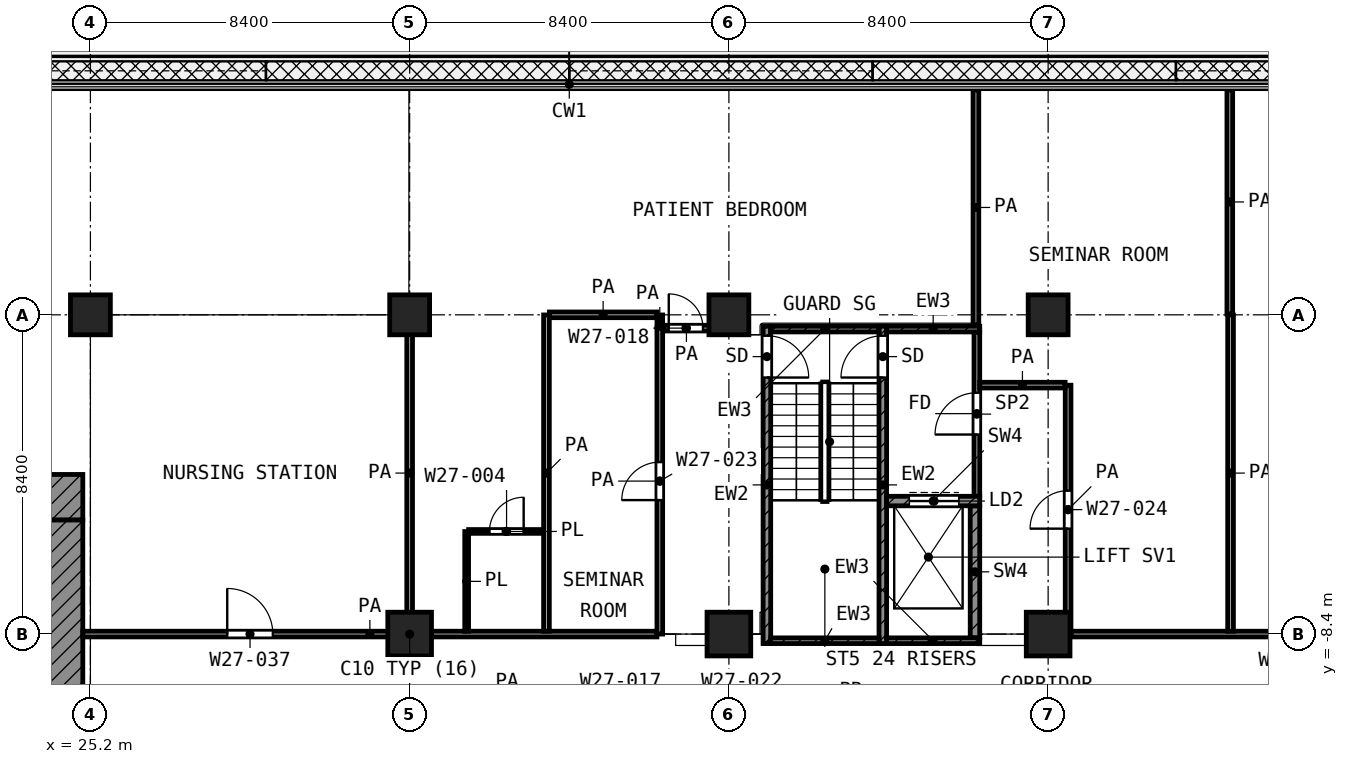
"""IFC4 building model, lengths in metres.
Left out: names, types, materials, properties, quantities, classifications, styles, units other than length and angle.
Written with IfcOpenShell. Run it as: python <this file> out.ifc"""

import sys

from ifc_helpers import new_model, si_unit, direction, frame, frame_2d, origin, origin_2d, place, context, subcontext, project, spatial, rectangle, extrude, element, fill, save


model = new_model("IFC4")
c1 = context("Model", 3, precision=1e-05, world=origin(), true_north=direction((0.0, 1.0)))
c2 = subcontext(c1, "Body", "Model", "MODEL_VIEW")
j1 = project(units=[si_unit("LENGTHUNIT", "METRE"), si_unit("PLANEANGLEUNIT", "RADIAN")], contexts=[c1])
p1 = place(None, origin())
s1 = spatial("IfcSite", under=j1, at=p1, CompositionType="ELEMENT")
p2 = place(p1, origin())
s2 = spatial("IfcBuilding", under=s1, at=p2, CompositionType="ELEMENT")
p3 = place(p2, frame((0.0, 0.0, 119.8)))
s3 = spatial("IfcBuildingStorey", under=s2, at=p3, CompositionType="ELEMENT", Elevation=119.8)
for number, where, z_axis, x_axis in (
    (1, (25.2, 0.0, 0.0), (0.0, 0.0, 1.0), (1.0, 0.0, 0.0)),
    (2, (33.6, 0.0, 0.0), (0.0, 0.0, 1.0), (1.0, 0.0, 0.0)),
    (3, (42.0, 0.0, 0.0), (0.0, 0.0, 1.0), (1.0, 0.0, 0.0)),
    (4, (50.4, 0.0, 0.0), (0.0, 0.0, 1.0), (1.0, 0.0, 0.0)),
):
    element("IfcColumn", number, at=place(p3, frame(where, z_axis=z_axis, x_axis=x_axis)), inside=s3, PredefinedType="COLUMN", context=c2, shape_type="SweptSolid", body=[
        extrude(rectangle(XDim=1.05, YDim=1.05, at=origin_2d()), origin(), (0.0, 0.0, 1.0), 4.2),
    ])
for number, where, z_axis, x_axis in (
    (5, (33.6, -8.4, 0.0), (0.0, 0.0, 1.0), (1.0, 0.0, 0.0)),
    (6, (42.0, -8.4, 0.0), (0.0, 0.0, 1.0), (1.0, 0.0, 0.0)),
    (7, (50.4, -8.4, 0.0), (0.0, 0.0, 1.0), (1.0, 0.0, 0.0)),
):
    element("IfcColumn", number, at=place(p3, frame(where, z_axis=z_axis, x_axis=x_axis)), inside=s3, PredefinedType="COLUMN", context=c2, shape_type="SweptSolid", body=[
        extrude(rectangle(XDim=1.15, YDim=1.15, at=origin_2d()), origin(), (0.0, 0.0, 1.0), 4.2),
    ])
p4 = place(p3, frame((4.2, -4.8, 0.0), z_axis=(0.0, 0.0, 1.0), x_axis=(1.0, 0.0, 0.0)))
e8 = element("IfcWall", 8, at=p4, inside=s3, PredefinedType="SHEAR", context=c2, shape_type="SweptSolid", body=[
    extrude(rectangle(XDim=20.8, YDim=1.2, at=frame_2d((10.4, 0.0))), origin(), (0.0, 0.0, 1.0), 3.6),
])
p5 = place(p4, frame((1.95, 0.0, 0.0)))
e9 = element("IfcOpeningElement", 9, at=p5, cuts=e8, PredefinedType="OPENING", context=c2, shape_type="SweptSolid", body=[
    extrude(rectangle(XDim=1.1, YDim=2.1, at=frame_2d((0.55, 1.05))), frame((0.0, 0.61, 0.0), z_axis=(0.0, -1.0, 0.0), x_axis=(1.0, 0.0, 0.0)), (0.0, 0.0, 1.0), 1.22),
])
p6 = place(p4, frame((17.95, 0.0, 0.0)))
e10 = element("IfcOpeningElement", 10, at=p6, cuts=e8, PredefinedType="OPENING", context=c2, shape_type="SweptSolid", body=[
    extrude(rectangle(XDim=1.1, YDim=2.1, at=frame_2d((0.55, 1.05))), frame((0.0, 0.61, 0.0), z_axis=(0.0, -1.0, 0.0), x_axis=(1.0, 0.0, 0.0)), (0.0, 0.0, 1.0), 1.22),
])
p7 = place(p3, frame((24.5, -24.0, 0.0), z_axis=(0.0, 0.0, 1.0), x_axis=(0.0, 1.0, 0.0)))
e11 = element("IfcWall", 11, at=p7, inside=s3, PredefinedType="SHEAR", context=c2, shape_type="SweptSolid", body=[
    extrude(rectangle(XDim=18.6, YDim=1.0, at=frame_2d((9.3, 0.0))), origin(), (0.0, 0.0, 1.0), 3.6),
])
p8 = place(p7, frame((10.5, 0.0, 0.0)))
e12 = element("IfcOpeningElement", 12, at=p8, cuts=e11, PredefinedType="OPENING", context=c2, shape_type="SweptSolid", body=[
    extrude(rectangle(XDim=1.8, YDim=2.1, at=frame_2d((0.9, 1.05))), frame((0.0, 0.51, 0.0), z_axis=(0.0, -1.0, 0.0), x_axis=(1.0, 0.0, 0.0)), (0.0, 0.0, 1.0), 1.02),
])
p9 = place(p3, frame((43.0, -8.65, 0.0), z_axis=(0.0, 0.0, 1.0), x_axis=(0.0, 1.0, 0.0)))
e13 = element("IfcWall", 13, at=p9, inside=s3, PredefinedType="SHEAR", context=c2, shape_type="SweptSolid", body=[
    extrude(rectangle(XDim=8.35, YDim=0.2, at=frame_2d((4.175, 0.0))), origin(), (0.0, 0.0, 1.0), 3.6),
])
p10 = place(p9, frame((7.0, 0.0, 0.0)))
e14 = element("IfcOpeningElement", 14, at=p10, cuts=e13, PredefinedType="OPENING", context=c2, shape_type="SweptSolid", body=[
    extrude(rectangle(XDim=1.1, YDim=2.1, at=frame_2d((0.55, 1.05))), frame((0.0, 0.11, 0.0), z_axis=(0.0, -1.0, 0.0), x_axis=(1.0, 0.0, 0.0)), (0.0, 0.0, 1.0), 0.22),
])
p11 = place(p3, frame((46.05, -8.65, 0.0), z_axis=(0.0, 0.0, 1.0), x_axis=(0.0, 1.0, 0.0)))
e15 = element("IfcWall", 15, at=p11, inside=s3, PredefinedType="SHEAR", context=c2, shape_type="SweptSolid", body=[
    extrude(rectangle(XDim=8.35, YDim=0.2, at=frame_2d((4.175, 0.0))), origin(), (0.0, 0.0, 1.0), 3.6),
])
p12 = place(p11, frame((7.0, 0.0, 0.0)))
e16 = element("IfcOpeningElement", 16, at=p12, cuts=e15, PredefinedType="OPENING", context=c2, shape_type="SweptSolid", body=[
    extrude(rectangle(XDim=1.1, YDim=2.1, at=frame_2d((0.55, 1.05))), frame((0.0, 0.11, 0.0), z_axis=(0.0, -1.0, 0.0), x_axis=(1.0, 0.0, 0.0)), (0.0, 0.0, 1.0), 0.22),
])
p13 = place(p3, frame((43.1, -0.375, 0.0), z_axis=(0.0, 0.0, 1.0), x_axis=(1.0, 0.0, 0.0)))
e17 = element("IfcWall", 17, at=p13, inside=s3, PredefinedType="SHEAR", context=c2, shape_type="SweptSolid", body=[
    extrude(rectangle(XDim=2.85, YDim=0.15, at=frame_2d((1.425, 0.0))), origin(), (0.0, 0.0, 1.0), 3.6),
])
p14 = place(p3, frame((46.15, -0.375, 0.0), z_axis=(0.0, 0.0, 1.0), x_axis=(1.0, 0.0, 0.0)))
e18 = element("IfcWall", 18, at=p14, inside=s3, PredefinedType="SHEAR", context=c2, shape_type="SweptSolid", body=[
    extrude(rectangle(XDim=2.45, YDim=0.15, at=frame_2d((1.225, 0.0))), origin(), (0.0, 0.0, 1.0), 3.6),
])
p15 = place(p3, frame((43.1, -8.575, 0.0), z_axis=(0.0, 0.0, 1.0), x_axis=(1.0, 0.0, 0.0)))
e19 = element("IfcWall", 19, at=p15, inside=s3, PredefinedType="SHEAR", context=c2, shape_type="SweptSolid", body=[
    extrude(rectangle(XDim=2.85, YDim=0.15, at=frame_2d((1.425, 0.0))), origin(), (0.0, 0.0, 1.0), 3.6),
])
p16 = place(p3, frame((46.15, -8.575, 0.0), z_axis=(0.0, 0.0, 1.0), x_axis=(1.0, 0.0, 0.0)))
e20 = element("IfcWall", 20, at=p16, inside=s3, PredefinedType="SHEAR", context=c2, shape_type="SweptSolid", body=[
    extrude(rectangle(XDim=2.45, YDim=0.15, at=frame_2d((1.225, 0.0))), origin(), (0.0, 0.0, 1.0), 3.6),
])
p17 = place(p3, frame((46.15, -4.9, 0.0), z_axis=(0.0, 0.0, 1.0), x_axis=(1.0, 0.0, 0.0)))
e21 = element("IfcWall", 21, at=p17, inside=s3, PredefinedType="SHEAR", context=c2, shape_type="SweptSolid", body=[
    extrude(rectangle(XDim=2.45, YDim=0.25, at=frame_2d((1.225, 0.0))), origin(), (0.0, 0.0, 1.0), 3.6),
])
p18 = place(p17, frame((0.6, 0.0, 0.0)))
e22 = element("IfcOpeningElement", 22, at=p18, cuts=e21, PredefinedType="OPENING", context=c2, shape_type="SweptSolid", body=[
    extrude(rectangle(XDim=1.3, YDim=2.1, at=frame_2d((0.65, 1.05))), frame((0.0, 0.135, 0.0), z_axis=(0.0, -1.0, 0.0), x_axis=(1.0, 0.0, 0.0)), (0.0, 0.0, 1.0), 0.27),
])
p19 = place(p3, frame((48.475, -8.5, 0.0), z_axis=(0.0, 0.0, 1.0), x_axis=(0.0, 1.0, 0.0)))
e23 = element("IfcWall", 23, at=p19, inside=s3, PredefinedType="SHEAR", context=c2, shape_type="SweptSolid", body=[
    extrude(rectangle(XDim=3.475, YDim=0.25, at=frame_2d((1.738, 0.0))), origin(), (0.0, 0.0, 1.0), 3.6),
])
p20 = place(p3, frame((48.525, -4.775, 0.0), z_axis=(0.0, 0.0, 1.0), x_axis=(0.0, 1.0, 0.0)))
e24 = element("IfcWall", 24, at=p20, inside=s3, PredefinedType="PARTITIONING", context=c2, shape_type="SweptSolid", body=[
    extrude(rectangle(XDim=4.325, YDim=0.15, at=frame_2d((2.163, 0.0))), origin(), (0.0, 0.0, 1.0), 3.6),
])
p21 = place(p20, frame((1.625, 0.0, 0.0)))
e25 = element("IfcOpeningElement", 25, at=p21, cuts=e24, PredefinedType="OPENING", context=c2, shape_type="SweptSolid", body=[
    extrude(rectangle(XDim=1.1, YDim=2.1, at=frame_2d((0.55, 1.05))), frame((0.0, 0.085, 0.0), z_axis=(0.0, -1.0, 0.0), x_axis=(1.0, 0.0, 0.0)), (0.0, 0.0, 1.0), 0.17),
])
p22 = place(p3, frame((35.151, -5.7, 0.0), z_axis=(0.0, 0.0, 1.0), x_axis=(1.0, 0.0, 0.0)))
e26 = element("IfcWall", 26, at=p22, inside=s3, PredefinedType="PARTITIONING", context=c2, shape_type="SweptSolid", body=[
    extrude(rectangle(XDim=1.974, YDim=0.1, at=frame_2d((0.987, 0.0))), origin(), (0.0, 0.0, 1.0), 3.6),
])
p23 = place(p22, frame((0.549, 0.0, 0.0)))
e27 = element("IfcOpeningElement", 27, at=p23, cuts=e26, PredefinedType="OPENING", context=c2, shape_type="SweptSolid", body=[
    extrude(rectangle(XDim=0.9, YDim=2.1, at=frame_2d((0.45, 1.05))), frame((0.0, 0.06, 0.0), z_axis=(0.0, -1.0, 0.0), x_axis=(1.0, 0.0, 0.0)), (0.0, 0.0, 1.0), 0.12),
])
p24 = place(p3, frame((35.1, -8.325, 0.0), z_axis=(0.0, 0.0, 1.0), x_axis=(0.0, 1.0, 0.0)))
e28 = element("IfcWall", 28, at=p24, inside=s3, PredefinedType="PARTITIONING", context=c2, shape_type="SweptSolid", body=[
    extrude(rectangle(XDim=2.623, YDim=0.1, at=frame_2d((1.312, 0.0))), origin(), (0.0, 0.0, 1.0), 3.6),
])
p25 = place(p3, frame((25.0, -8.4, 0.0), z_axis=(0.0, 0.0, 1.0), x_axis=(1.0, 0.0, 0.0)))
e29 = element("IfcWall", 29, at=p25, inside=s3, PredefinedType="PARTITIONING", context=c2, shape_type="SweptSolid", body=[
    extrude(rectangle(XDim=15.107, YDim=0.15, at=frame_2d((7.553, 0.0))), origin(), (0.0, 0.0, 1.0), 3.6),
])
p26 = place(p25, frame((3.8, 0.0, 0.0)))
e30 = element("IfcOpeningElement", 30, at=p26, cuts=e29, PredefinedType="OPENING", context=c2, shape_type="SweptSolid", body=[
    extrude(rectangle(XDim=1.2, YDim=2.1, at=frame_2d((0.6, 1.05))), frame((0.0, 0.085, 0.0), z_axis=(0.0, -1.0, 0.0), x_axis=(1.0, 0.0, 0.0)), (0.0, 0.0, 1.0), 0.17),
])
p27 = place(p3, frame((51.0, -8.4, 0.0), z_axis=(0.0, 0.0, 1.0), x_axis=(1.0, 0.0, 0.0)))
e31 = element("IfcWall", 31, at=p27, inside=s3, PredefinedType="PARTITIONING", context=c2, shape_type="SweptSolid", body=[
    extrude(rectangle(XDim=24.52, YDim=0.15, at=frame_2d((12.26, 0.0))), origin(), (0.0, 0.0, 1.0), 3.6),
])
p28 = place(p27, frame((5.4, 0.0, 0.0)))
e32 = element("IfcOpeningElement", 32, at=p28, cuts=e31, PredefinedType="OPENING", context=c2, shape_type="SweptSolid", body=[
    extrude(rectangle(XDim=1.2, YDim=2.1, at=frame_2d((0.6, 1.05))), frame((0.0, 0.085, 0.0), z_axis=(0.0, -1.0, 0.0), x_axis=(1.0, 0.0, 0.0)), (0.0, 0.0, 1.0), 0.17),
])
p29 = place(p27, frame((8.45, 0.0, 0.0)))
e33 = element("IfcOpeningElement", 33, at=p29, cuts=e31, PredefinedType="OPENING", context=c2, shape_type="SweptSolid", body=[
    extrude(rectangle(XDim=0.9, YDim=2.1, at=frame_2d((0.45, 1.05))), frame((0.0, 0.085, 0.0), z_axis=(0.0, -1.0, 0.0), x_axis=(1.0, 0.0, 0.0)), (0.0, 0.0, 1.0), 0.17),
])
p30 = place(p27, frame((14.0, 0.0, 0.0)))
e34 = element("IfcOpeningElement", 34, at=p30, cuts=e31, PredefinedType="OPENING", context=c2, shape_type="SweptSolid", body=[
    extrude(rectangle(XDim=1.2, YDim=2.1, at=frame_2d((0.6, 1.05))), frame((0.0, 0.085, 0.0), z_axis=(0.0, -1.0, 0.0), x_axis=(1.0, 0.0, 0.0)), (0.0, 0.0, 1.0), 0.17),
])
p31 = place(p27, frame((16.8, 0.0, 0.0)))
e35 = element("IfcOpeningElement", 35, at=p31, cuts=e31, PredefinedType="OPENING", context=c2, shape_type="SweptSolid", body=[
    extrude(rectangle(XDim=1.2, YDim=2.1, at=frame_2d((0.6, 1.05))), frame((0.0, 0.085, 0.0), z_axis=(0.0, -1.0, 0.0), x_axis=(1.0, 0.0, 0.0)), (0.0, 0.0, 1.0), 0.17),
])
p32 = place(p27, frame((22.15, 0.0, 0.0)))
e36 = element("IfcOpeningElement", 36, at=p32, cuts=e31, PredefinedType="OPENING", context=c2, shape_type="SweptSolid", body=[
    extrude(rectangle(XDim=1.0, YDim=2.1, at=frame_2d((0.5, 1.05))), frame((0.0, 0.085, 0.0), z_axis=(0.0, -1.0, 0.0), x_axis=(1.0, 0.0, 0.0)), (0.0, 0.0, 1.0), 0.17),
])
p33 = place(p3, frame((48.6, -1.85, 0.0), z_axis=(0.0, 0.0, 1.0), x_axis=(1.0, 0.0, 0.0)))
e37 = element("IfcWall", 37, at=p33, inside=s3, PredefinedType="PARTITIONING", context=c2, shape_type="SweptSolid", body=[
    extrude(rectangle(XDim=2.247, YDim=0.15, at=frame_2d((1.124, 0.0))), origin(), (0.0, 0.0, 1.0), 3.6),
])
p34 = place(p3, frame((40.277, -0.35, 0.0), z_axis=(0.0, 0.0, 1.0), x_axis=(1.0, 0.0, 0.0)))
e38 = element("IfcWall", 38, at=p34, inside=s3, PredefinedType="PARTITIONING", context=c2, shape_type="SweptSolid", body=[
    extrude(rectangle(XDim=1.211, YDim=0.15, at=frame_2d((0.605, 0.0))), origin(), (0.0, 0.0, 1.0), 3.6),
])
p35 = place(p34, frame((0.141, 0.0, 0.0)))
e39 = element("IfcOpeningElement", 39, at=p35, cuts=e38, PredefinedType="OPENING", context=c2, shape_type="SweptSolid", body=[
    extrude(rectangle(XDim=0.9, YDim=2.1, at=frame_2d((0.45, 1.05))), frame((0.0, 0.085, 0.0), z_axis=(0.0, -1.0, 0.0), x_axis=(1.0, 0.0, 0.0)), (0.0, 0.0, 1.0), 0.17),
])
p36 = place(p3, frame((37.278, 0.0, 0.0), z_axis=(0.0, 0.0, 1.0), x_axis=(1.0, 0.0, 0.0)))
e40 = element("IfcWall", 40, at=p36, inside=s3, PredefinedType="PARTITIONING", context=c2, shape_type="SweptSolid", body=[
    extrude(rectangle(XDim=2.826, YDim=0.15, at=frame_2d((1.413, 0.0))), origin(), (0.0, 0.0, 1.0), 3.6),
])
for number, where, z_axis, x_axis in (
    (41, (33.6, -8.325, 0.0), (0.0, 0.0, 1.0), (0.0, 1.0, 0.0)),
    (42, (37.2, -8.325, 0.0), (0.0, 0.0, 1.0), (0.0, 1.0, 0.0)),
):
    element("IfcWall", number, at=place(p3, frame(where, z_axis=z_axis, x_axis=x_axis)), inside=s3, PredefinedType="PARTITIONING", context=c2, shape_type="SweptSolid", body=[
        extrude(rectangle(XDim=8.322, YDim=0.15, at=frame_2d((4.161, 0.0))), origin(), (0.0, 0.0, 1.0), 3.6),
    ])
p37 = place(p3, frame((40.182, -8.4, 0.0), z_axis=(0.0, 0.0, 1.0), x_axis=(0.0, 1.0, 0.0)))
e43 = element("IfcWall", 43, at=p37, inside=s3, PredefinedType="PARTITIONING", context=c2, shape_type="SweptSolid", body=[
    extrude(rectangle(XDim=8.05, YDim=0.15, at=frame_2d((4.025, 0.0))), origin(), (0.0, 0.0, 1.0), 3.6),
])
p38 = place(p37, frame((3.525, 0.0, 0.0)))
e44 = element("IfcOpeningElement", 44, at=p38, cuts=e43, PredefinedType="OPENING", context=c2, shape_type="SweptSolid", body=[
    extrude(rectangle(XDim=1.0, YDim=2.1, at=frame_2d((0.5, 1.05))), frame((0.0, 0.085, 0.0), z_axis=(0.0, -1.0, 0.0), x_axis=(1.0, 0.0, 0.0)), (0.0, 0.0, 1.0), 0.17),
])
p39 = place(p3, frame((40.182, -0.33, 0.0), z_axis=(0.0, 0.0, 1.0), x_axis=(0.0, 1.0, 0.0)))
e45 = element("IfcWall", 45, at=p39, inside=s3, PredefinedType="PARTITIONING", context=c2, shape_type="SweptSolid", body=[
    extrude(rectangle(XDim=0.327, YDim=0.15, at=frame_2d((0.164, 0.0))), origin(), (0.0, 0.0, 1.0), 3.6),
])
p40 = place(p3, frame((48.5, -0.27, 0.0), z_axis=(0.0, 0.0, 1.0), x_axis=(0.0, 1.0, 0.0)))
e46 = element("IfcWall", 46, at=p40, inside=s3, PredefinedType="PARTITIONING", context=c2, shape_type="SweptSolid", body=[
    extrude(rectangle(XDim=6.19, YDim=0.15, at=frame_2d((3.095, 0.0))), origin(), (0.0, 0.0, 1.0), 3.6),
])
p41 = place(p3, frame((50.925, -8.4, 0.0), z_axis=(0.0, 0.0, 1.0), x_axis=(0.0, 1.0, 0.0)))
e47 = element("IfcWall", 47, at=p41, inside=s3, PredefinedType="PARTITIONING", context=c2, shape_type="SweptSolid", body=[
    extrude(rectangle(XDim=6.548, YDim=0.15, at=frame_2d((3.274, 0.0))), origin(), (0.0, 0.0, 1.0), 3.6),
])
p42 = place(p41, frame((2.774, 0.0, 0.0)))
e48 = element("IfcOpeningElement", 48, at=p42, cuts=e47, PredefinedType="OPENING", context=c2, shape_type="SweptSolid", body=[
    extrude(rectangle(XDim=1.0, YDim=2.1, at=frame_2d((0.5, 1.05))), frame((0.0, 0.085, 0.0), z_axis=(0.0, -1.0, 0.0), x_axis=(1.0, 0.0, 0.0)), (0.0, 0.0, 1.0), 0.17),
])
p43 = place(p3, frame((55.18, 0.02, 0.0), z_axis=(0.0, 0.0, 1.0), x_axis=(0.0, 1.0, 0.0)))
e49 = element("IfcWall", 49, at=p43, inside=s3, PredefinedType="PARTITIONING", context=c2, shape_type="SweptSolid", body=[
    extrude(rectangle(XDim=5.9, YDim=0.15, at=frame_2d((2.95, 0.0))), origin(), (0.0, 0.0, 1.0), 3.6),
])
p44 = place(p3, frame((55.2, -8.325, 0.0), z_axis=(0.0, 0.0, 1.0), x_axis=(0.0, 1.0, 0.0)))
e50 = element("IfcWall", 50, at=p44, inside=s3, PredefinedType="PARTITIONING", context=c2, shape_type="SweptSolid", body=[
    extrude(rectangle(XDim=8.321, YDim=0.15, at=frame_2d((4.161, 0.0))), origin(), (0.0, 0.0, 1.0), 3.6),
])
p45 = place(p10, frame((1.1, 0.0, 0.0), z_axis=(0.0, 0.0, 1.0), x_axis=(-1.0, 0.0, 0.0)))
e51 = element("IfcDoor", 51, at=p45, inside=s3, OperationType="SINGLE_SWING_LEFT", PredefinedType="DOOR", context=c2, shape_type="SweptSolid", body=[
    extrude(rectangle(XDim=1.1, YDim=2.1, at=frame_2d((0.55, 1.05))), frame((0.0, 0.025, 0.0), z_axis=(0.0, -1.0, 0.0), x_axis=(1.0, 0.0, 0.0)), (0.0, 0.0, 1.0), 0.05),
])
fill(e14, e51)
p46 = place(p12, origin())
e52 = element("IfcDoor", 52, at=p46, inside=s3, OperationType="SINGLE_SWING_LEFT", PredefinedType="DOOR", context=c2, shape_type="SweptSolid", body=[
    extrude(rectangle(XDim=1.1, YDim=2.1, at=frame_2d((0.55, 1.05))), frame((0.0, 0.025, 0.0), z_axis=(0.0, -1.0, 0.0), x_axis=(1.0, 0.0, 0.0)), (0.0, 0.0, 1.0), 0.05),
])
fill(e16, e52)
p47 = place(p18, origin())
e53 = element("IfcDoor", 53, at=p47, inside=s3, OperationType="DOUBLE_DOOR_SLIDING", PredefinedType="DOOR", context=c2, shape_type="SweptSolid", body=[
    extrude(rectangle(XDim=1.3, YDim=2.1, at=frame_2d((0.65, 1.05))), frame((0.0, 0.025, 0.0), z_axis=(0.0, -1.0, 0.0), x_axis=(1.0, 0.0, 0.0)), (0.0, 0.0, 1.0), 0.05),
])
fill(e22, e53)
p48 = place(p21, origin())
e54 = element("IfcDoor", 54, at=p48, inside=s3, OperationType="SINGLE_SWING_LEFT", PredefinedType="DOOR", context=c2, shape_type="SweptSolid", body=[
    extrude(rectangle(XDim=1.1, YDim=2.1, at=frame_2d((0.55, 1.05))), frame((0.0, 0.025, 0.0), z_axis=(0.0, -1.0, 0.0), x_axis=(1.0, 0.0, 0.0)), (0.0, 0.0, 1.0), 0.05),
])
fill(e25, e54)
p49 = place(p26, origin())
e55 = element("IfcDoor", 55, at=p49, inside=s3, OperationType="SINGLE_SWING_LEFT", PredefinedType="DOOR", context=c2, shape_type="SweptSolid", body=[
    extrude(rectangle(XDim=1.2, YDim=2.1, at=frame_2d((0.6, 1.05))), frame((0.0, 0.025, 0.0), z_axis=(0.0, -1.0, 0.0), x_axis=(1.0, 0.0, 0.0)), (0.0, 0.0, 1.0), 0.05),
])
fill(e30, e55)
p50 = place(p35, origin())
e56 = element("IfcDoor", 56, at=p50, inside=s3, OperationType="SINGLE_SWING_LEFT", PredefinedType="DOOR", context=c2, shape_type="SweptSolid", body=[
    extrude(rectangle(XDim=0.9, YDim=2.1, at=frame_2d((0.45, 1.05))), frame((0.0, 0.025, 0.0), z_axis=(0.0, -1.0, 0.0), x_axis=(1.0, 0.0, 0.0)), (0.0, 0.0, 1.0), 0.05),
])
fill(e39, e56)
p51 = place(p23, origin())
e57 = element("IfcDoor", 57, at=p51, inside=s3, OperationType="SINGLE_SWING_RIGHT", PredefinedType="DOOR", context=c2, shape_type="SweptSolid", body=[
    extrude(rectangle(XDim=0.9, YDim=2.1, at=frame_2d((0.45, 1.05))), frame((0.0, 0.025, 0.0), z_axis=(0.0, -1.0, 0.0), x_axis=(1.0, 0.0, 0.0)), (0.0, 0.0, 1.0), 0.05),
])
fill(e27, e57)
p52 = place(p38, origin())
e58 = element("IfcDoor", 58, at=p52, inside=s3, OperationType="SINGLE_SWING_LEFT", PredefinedType="DOOR", context=c2, shape_type="SweptSolid", body=[
    extrude(rectangle(XDim=1.0, YDim=2.1, at=frame_2d((0.5, 1.05))), frame((0.0, 0.025, 0.0), z_axis=(0.0, -1.0, 0.0), x_axis=(1.0, 0.0, 0.0)), (0.0, 0.0, 1.0), 0.05),
])
fill(e44, e58)
p53 = place(p42, origin())
e59 = element("IfcDoor", 59, at=p53, inside=s3, OperationType="SINGLE_SWING_LEFT", PredefinedType="DOOR", context=c2, shape_type="SweptSolid", body=[
    extrude(rectangle(XDim=1.0, YDim=2.1, at=frame_2d((0.5, 1.05))), frame((0.0, 0.025, 0.0), z_axis=(0.0, -1.0, 0.0), x_axis=(1.0, 0.0, 0.0)), (0.0, 0.0, 1.0), 0.05),
])
fill(e48, e59)
save(model, sys.argv[1])
